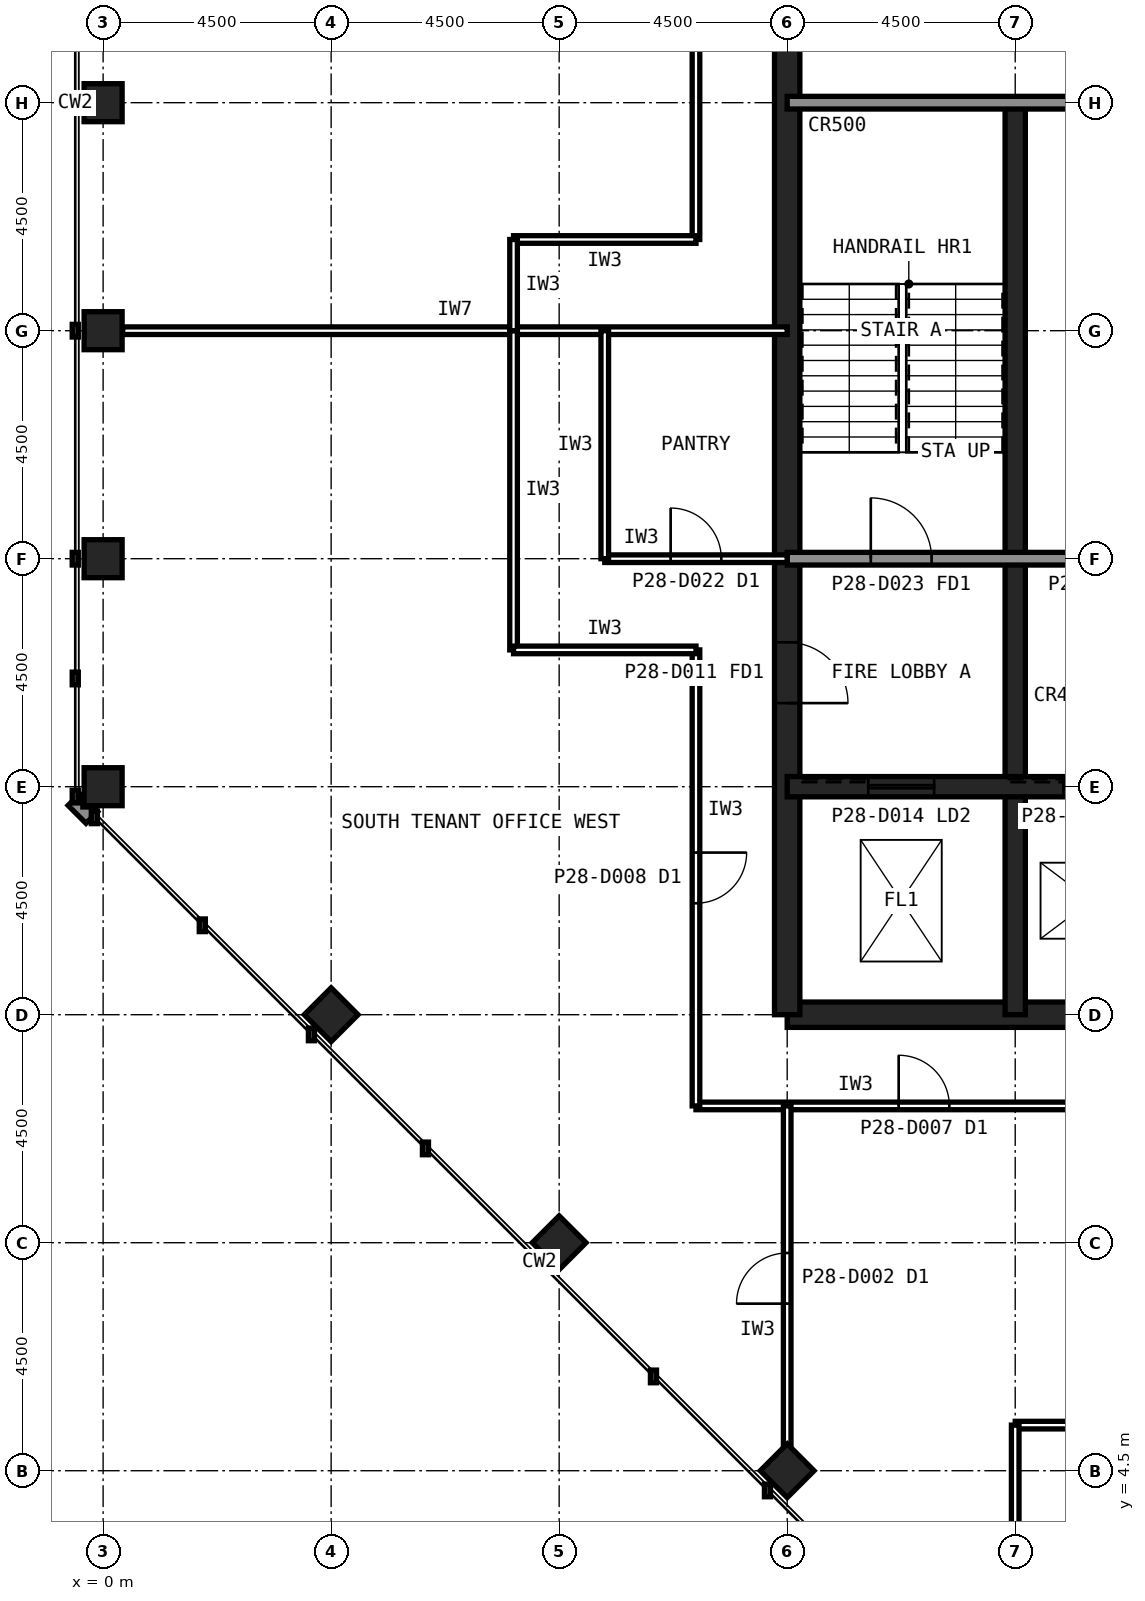
"""IFC4 building model, lengths in metres.
Left out: names, types, materials, properties, quantities, classifications, styles, units other than length and angle.
Written with IfcOpenShell. Run it as: python <this file> out.ifc"""

import sys

from ifc_helpers import new_model, si_unit, direction, frame, frame_2d, origin, origin_2d, place, context, subcontext, project, spatial, rectangle, hollow_rectangle, extrude, element, fill, save


model = new_model("IFC4")
c1 = context("Model", 3, precision=1e-05, world=origin(), true_north=direction((0.0, 1.0)))
c2 = subcontext(c1, "Body", "Model", "MODEL_VIEW")
j1 = project(units=[si_unit("LENGTHUNIT", "METRE"), si_unit("PLANEANGLEUNIT", "RADIAN")], contexts=[c1])
p1 = place(None, origin())
s1 = spatial("IfcSite", under=j1, at=p1, CompositionType="ELEMENT")
p2 = place(p1, origin())
s2 = spatial("IfcBuilding", under=s1, at=p2, CompositionType="ELEMENT")
p3 = place(p2, frame((0.0, 0.0, 119.6)))
s3 = spatial("IfcBuildingStorey", under=s2, at=p3, CompositionType="ELEMENT", Elevation=119.6)
for number, where, z_axis, x_axis in (
    (1, (0.0, 31.5, 0.0), (0.0, 0.0, 1.0), (1.0, 0.0, 0.0)),
    (2, (0.0, 27.0, 0.0), (0.0, 0.0, 1.0), (1.0, 0.0, 0.0)),
    (3, (0.0, 22.5, 0.0), (0.0, 0.0, 1.0), (1.0, 0.0, 0.0)),
    (4, (0.0, 18.0, 0.0), (0.0, 0.0, 1.0), (1.0, 0.0, 0.0)),
    (5, (13.5, 4.5, 0.0), (0.0, 0.0, 1.0), (0.707, 0.707, 0.0)),
    (6, (9.0, 9.0, 0.0), (0.0, 0.0, 1.0), (0.707, 0.707, 0.0)),
    (7, (4.5, 13.5, 0.0), (0.0, 0.0, 1.0), (0.707, 0.707, 0.0)),
):
    element("IfcColumn", number, at=place(p3, frame(where, z_axis=z_axis, x_axis=x_axis)), inside=s3, PredefinedType="COLUMN", context=c2, shape_type="SweptSolid", body=[
        extrude(hollow_rectangle(XDim=0.75, YDim=0.75, WallThickness=0.04, at=origin_2d()), origin(), (0.0, 0.0, 1.0), 4.0),
    ])
p4 = place(p3, frame((13.5, 13.5, 0.0), z_axis=(0.0, 0.0, 1.0), x_axis=(1.0, 0.0, 0.0)))
e8 = element("IfcWall", 8, at=p4, inside=s3, PredefinedType="SHEAR", context=c2, shape_type="SweptSolid", body=[
    extrude(rectangle(XDim=27.0, YDim=0.5, at=frame_2d((13.5, 0.0))), origin(), (0.0, 0.0, 1.0), 4.0),
])
p5 = place(p3, frame((13.5, 40.5, 0.0), z_axis=(0.0, 0.0, 1.0), x_axis=(0.0, -1.0, 0.0)))
e9 = element("IfcWall", 9, at=p5, inside=s3, PredefinedType="SHEAR", context=c2, shape_type="SweptSolid", body=[
    extrude(rectangle(XDim=27.0, YDim=0.5, at=frame_2d((13.5, 0.0))), origin(), (0.0, 0.0, 1.0), 4.0),
])
p6 = place(p5, frame((19.65, 0.0, 0.0)))
e10 = element("IfcOpeningElement", 10, at=p6, cuts=e9, PredefinedType="OPENING", context=c2, shape_type="SweptSolid", body=[
    extrude(rectangle(XDim=1.2, YDim=2.1, at=frame_2d((0.6, 1.05))), frame((0.0, 0.26, 0.0), z_axis=(0.0, -1.0, 0.0), x_axis=(1.0, 0.0, 0.0)), (0.0, 0.0, 1.0), 0.52),
])
p7 = place(p5, frame((5.85, 0.0, 0.0)))
e11 = element("IfcOpeningElement", 11, at=p7, cuts=e9, PredefinedType="OPENING", context=c2, shape_type="SweptSolid", body=[
    extrude(rectangle(XDim=1.8, YDim=2.1, at=frame_2d((0.9, 1.05))), frame((0.0, 0.26, 0.0), z_axis=(0.0, -1.0, 0.0), x_axis=(1.0, 0.0, 0.0)), (0.0, 0.0, 1.0), 0.52),
])
p8 = place(p3, frame((18.0, 13.5, 0.0), z_axis=(0.0, 0.0, 1.0), x_axis=(0.0, 1.0, 0.0)))
e12 = element("IfcWall", 12, at=p8, inside=s3, PredefinedType="SHEAR", context=c2, shape_type="SweptSolid", body=[
    extrude(rectangle(XDim=18.0, YDim=0.4, at=frame_2d((9.0, 0.0))), origin(), (0.0, 0.0, 1.0), 4.0),
])
p9 = place(p3, frame((13.5, 18.0, 0.0), z_axis=(0.0, 0.0, 1.0), x_axis=(1.0, 0.0, 0.0)))
e13 = element("IfcWall", 13, at=p9, inside=s3, PredefinedType="SHEAR", context=c2, shape_type="SweptSolid", body=[
    extrude(rectangle(XDim=27.0, YDim=0.4, at=frame_2d((13.5, 0.0))), origin(), (0.0, 0.0, 1.0), 4.0),
])
p10 = place(p9, frame((24.3, 0.0, 0.0)))
e14 = element("IfcOpeningElement", 14, at=p10, cuts=e13, PredefinedType="OPENING", context=c2, shape_type="SweptSolid", body=[
    extrude(rectangle(XDim=0.9, YDim=2.1, at=frame_2d((0.45, 1.05))), frame((0.0, 0.21, 0.0), z_axis=(0.0, -1.0, 0.0), x_axis=(1.0, 0.0, 0.0)), (0.0, 0.0, 1.0), 0.42),
])
p11 = place(p9, frame((5.45, 0.0, 0.0)))
e15 = element("IfcOpeningElement", 15, at=p11, cuts=e13, PredefinedType="OPENING", context=c2, shape_type="SweptSolid", body=[
    extrude(rectangle(XDim=1.1, YDim=2.1, at=frame_2d((0.55, 1.05))), frame((0.0, 0.21, 0.0), z_axis=(0.0, -1.0, 0.0), x_axis=(1.0, 0.0, 0.0)), (0.0, 0.0, 1.0), 0.42),
])
p12 = place(p9, frame((8.45, 0.0, 0.0)))
e16 = element("IfcOpeningElement", 16, at=p12, cuts=e13, PredefinedType="OPENING", context=c2, shape_type="SweptSolid", body=[
    extrude(rectangle(XDim=1.1, YDim=2.1, at=frame_2d((0.55, 1.05))), frame((0.0, 0.21, 0.0), z_axis=(0.0, -1.0, 0.0), x_axis=(1.0, 0.0, 0.0)), (0.0, 0.0, 1.0), 0.42),
])
p13 = place(p9, frame((11.45, 0.0, 0.0)))
e17 = element("IfcOpeningElement", 17, at=p13, cuts=e13, PredefinedType="OPENING", context=c2, shape_type="SweptSolid", body=[
    extrude(rectangle(XDim=1.1, YDim=2.1, at=frame_2d((0.55, 1.05))), frame((0.0, 0.21, 0.0), z_axis=(0.0, -1.0, 0.0), x_axis=(1.0, 0.0, 0.0)), (0.0, 0.0, 1.0), 0.42),
])
p14 = place(p9, frame((14.45, 0.0, 0.0)))
e18 = element("IfcOpeningElement", 18, at=p14, cuts=e13, PredefinedType="OPENING", context=c2, shape_type="SweptSolid", body=[
    extrude(rectangle(XDim=1.1, YDim=2.1, at=frame_2d((0.55, 1.05))), frame((0.0, 0.21, 0.0), z_axis=(0.0, -1.0, 0.0), x_axis=(1.0, 0.0, 0.0)), (0.0, 0.0, 1.0), 0.42),
])
p15 = place(p9, frame((17.45, 0.0, 0.0)))
e19 = element("IfcOpeningElement", 19, at=p15, cuts=e13, PredefinedType="OPENING", context=c2, shape_type="SweptSolid", body=[
    extrude(rectangle(XDim=1.1, YDim=2.1, at=frame_2d((0.55, 1.05))), frame((0.0, 0.21, 0.0), z_axis=(0.0, -1.0, 0.0), x_axis=(1.0, 0.0, 0.0)), (0.0, 0.0, 1.0), 0.42),
])
p16 = place(p9, frame((20.45, 0.0, 0.0)))
e20 = element("IfcOpeningElement", 20, at=p16, cuts=e13, PredefinedType="OPENING", context=c2, shape_type="SweptSolid", body=[
    extrude(rectangle(XDim=1.1, YDim=2.1, at=frame_2d((0.55, 1.05))), frame((0.0, 0.21, 0.0), z_axis=(0.0, -1.0, 0.0), x_axis=(1.0, 0.0, 0.0)), (0.0, 0.0, 1.0), 0.42),
])
p17 = place(p9, frame((1.6, 0.0, 0.0)))
e21 = element("IfcOpeningElement", 21, at=p17, cuts=e13, PredefinedType="OPENING", context=c2, shape_type="SweptSolid", body=[
    extrude(rectangle(XDim=1.3, YDim=2.2, at=frame_2d((0.65, 1.1))), frame((0.0, 0.21, 0.0), z_axis=(0.0, -1.0, 0.0), x_axis=(1.0, 0.0, 0.0)), (0.0, 0.0, 1.0), 0.42),
])
p18 = place(p3, frame((13.5, 22.5, 0.0), z_axis=(0.0, 0.0, 1.0), x_axis=(1.0, 0.0, 0.0)))
e22 = element("IfcWall", 22, at=p18, inside=s3, PredefinedType="SOLIDWALL", context=c2, shape_type="SweptSolid", body=[
    extrude(rectangle(XDim=27.0, YDim=0.25, at=frame_2d((13.5, 0.0))), origin(), (0.0, 0.0, 1.0), 3.84),
])
p19 = place(p18, frame((1.65, 0.0, 0.0)))
e23 = element("IfcOpeningElement", 23, at=p19, cuts=e22, PredefinedType="OPENING", context=c2, shape_type="SweptSolid", body=[
    extrude(rectangle(XDim=1.2, YDim=2.1, at=frame_2d((0.6, 1.05))), frame((0.0, 0.135, 0.0), z_axis=(0.0, -1.0, 0.0), x_axis=(1.0, 0.0, 0.0)), (0.0, 0.0, 1.0), 0.27),
])
p20 = place(p18, frame((6.025, 0.0, 0.0)))
e24 = element("IfcOpeningElement", 24, at=p20, cuts=e22, PredefinedType="OPENING", context=c2, shape_type="SweptSolid", body=[
    extrude(rectangle(XDim=1.0, YDim=2.1, at=frame_2d((0.5, 1.05))), frame((0.0, 0.135, 0.0), z_axis=(0.0, -1.0, 0.0), x_axis=(1.0, 0.0, 0.0)), (0.0, 0.0, 1.0), 0.27),
])
p21 = place(p18, frame((10.525, 0.0, 0.0)))
e25 = element("IfcOpeningElement", 25, at=p21, cuts=e22, PredefinedType="OPENING", context=c2, shape_type="SweptSolid", body=[
    extrude(rectangle(XDim=1.0, YDim=2.1, at=frame_2d((0.5, 1.05))), frame((0.0, 0.135, 0.0), z_axis=(0.0, -1.0, 0.0), x_axis=(1.0, 0.0, 0.0)), (0.0, 0.0, 1.0), 0.27),
])
p22 = place(p18, frame((19.75, 0.0, 0.0)))
e26 = element("IfcOpeningElement", 26, at=p22, cuts=e22, PredefinedType="OPENING", context=c2, shape_type="SweptSolid", body=[
    extrude(rectangle(XDim=1.0, YDim=2.1, at=frame_2d((0.5, 1.05))), frame((0.0, 0.135, 0.0), z_axis=(0.0, -1.0, 0.0), x_axis=(1.0, 0.0, 0.0)), (0.0, 0.0, 1.0), 0.27),
])
p23 = place(p18, frame((15.05, 0.0, 0.0)))
e27 = element("IfcOpeningElement", 27, at=p23, cuts=e22, PredefinedType="OPENING", context=c2, shape_type="SweptSolid", body=[
    extrude(rectangle(XDim=1.4, YDim=2.4, at=frame_2d((0.7, 1.2))), frame((0.0, 0.135, 0.0), z_axis=(0.0, -1.0, 0.0), x_axis=(1.0, 0.0, 0.0)), (0.0, 0.0, 1.0), 0.27),
])
p24 = place(p3, frame((13.5, 31.5, 0.0), z_axis=(0.0, 0.0, 1.0), x_axis=(1.0, 0.0, 0.0)))
e28 = element("IfcWall", 28, at=p24, inside=s3, PredefinedType="SOLIDWALL", context=c2, shape_type="SweptSolid", body=[
    extrude(rectangle(XDim=27.0, YDim=0.25, at=frame_2d((13.5, 0.0))), origin(), (0.0, 0.0, 1.0), 3.84),
])
p25 = place(p24, frame((24.15, 0.0, 0.0)))
e29 = element("IfcOpeningElement", 29, at=p25, cuts=e28, PredefinedType="OPENING", context=c2, shape_type="SweptSolid", body=[
    extrude(rectangle(XDim=1.2, YDim=2.1, at=frame_2d((0.6, 1.05))), frame((0.0, 0.135, 0.0), z_axis=(0.0, -1.0, 0.0), x_axis=(1.0, 0.0, 0.0)), (0.0, 0.0, 1.0), 0.27),
])
p26 = place(p24, frame((15.3, 0.0, 0.0)))
e30 = element("IfcOpeningElement", 30, at=p26, cuts=e28, PredefinedType="OPENING", context=c2, shape_type="SweptSolid", body=[
    extrude(rectangle(XDim=0.9, YDim=2.1, at=frame_2d((0.45, 1.05))), frame((0.0, 0.135, 0.0), z_axis=(0.0, -1.0, 0.0), x_axis=(1.0, 0.0, 0.0)), (0.0, 0.0, 1.0), 0.27),
])
p27 = place(p24, frame((19.8, 0.0, 0.0)))
e31 = element("IfcOpeningElement", 31, at=p27, cuts=e28, PredefinedType="OPENING", context=c2, shape_type="SweptSolid", body=[
    extrude(rectangle(XDim=0.9, YDim=2.1, at=frame_2d((0.45, 1.05))), frame((0.0, 0.135, 0.0), z_axis=(0.0, -1.0, 0.0), x_axis=(1.0, 0.0, 0.0)), (0.0, 0.0, 1.0), 0.27),
])
p28 = place(p3, frame((0.385, 27.0, 0.0), z_axis=(0.0, 0.0, 1.0), x_axis=(1.0, 0.0, 0.0)))
e32 = element("IfcWall", 32, at=p28, inside=s3, PredefinedType="PARTITIONING", context=c2, shape_type="SweptSolid", body=[
    extrude(rectangle(XDim=13.115, YDim=0.15, at=frame_2d((6.558, 0.0))), origin(), (0.0, 0.0, 1.0), 2.989),
])
p29 = place(p3, frame((11.7, 11.7, 0.0), z_axis=(0.0, 0.0, 1.0), x_axis=(1.0, 0.0, 0.0)))
e33 = element("IfcWall", 33, at=p29, inside=s3, PredefinedType="PARTITIONING", context=c2, shape_type="SweptSolid", body=[
    extrude(rectangle(XDim=9.0, YDim=0.15, at=frame_2d((4.5, 0.0))), origin(), (0.0, 0.0, 1.0), 3.84),
])
p30 = place(p29, frame((4.0, 0.0, 0.0)))
e34 = element("IfcOpeningElement", 34, at=p30, cuts=e33, PredefinedType="OPENING", context=c2, shape_type="SweptSolid", body=[
    extrude(rectangle(XDim=1.0, YDim=2.1, at=frame_2d((0.5, 1.05))), frame((0.0, 0.085, 0.0), z_axis=(0.0, -1.0, 0.0), x_axis=(1.0, 0.0, 0.0)), (0.0, 0.0, 1.0), 0.17),
])
p31 = place(p3, frame((11.7, 20.7, 0.0), z_axis=(0.0, 0.0, 1.0), x_axis=(0.0, -1.0, 0.0)))
e35 = element("IfcWall", 35, at=p31, inside=s3, PredefinedType="PARTITIONING", context=c2, shape_type="SweptSolid", body=[
    extrude(rectangle(XDim=9.0, YDim=0.15, at=frame_2d((4.5, 0.0))), origin(), (0.0, 0.0, 1.0), 3.84),
])
p32 = place(p31, frame((4.0, 0.0, 0.0)))
e36 = element("IfcOpeningElement", 36, at=p32, cuts=e35, PredefinedType="OPENING", context=c2, shape_type="SweptSolid", body=[
    extrude(rectangle(XDim=1.0, YDim=2.1, at=frame_2d((0.5, 1.05))), frame((0.0, 0.085, 0.0), z_axis=(0.0, -1.0, 0.0), x_axis=(1.0, 0.0, 0.0)), (0.0, 0.0, 1.0), 0.17),
])
p33 = place(p3, frame((8.1, 27.0, 0.0), z_axis=(0.0, 0.0, 1.0), x_axis=(0.0, -1.0, 0.0)))
e37 = element("IfcWall", 37, at=p33, inside=s3, PredefinedType="PARTITIONING", context=c2, shape_type="SweptSolid", body=[
    extrude(rectangle(XDim=6.3, YDim=0.15, at=frame_2d((3.15, 0.0))), origin(), (0.0, 0.0, 1.0), 3.84),
])
p34 = place(p3, frame((8.1, 20.7, 0.0), z_axis=(0.0, 0.0, 1.0), x_axis=(1.0, 0.0, 0.0)))
e38 = element("IfcWall", 38, at=p34, inside=s3, PredefinedType="PARTITIONING", context=c2, shape_type="SweptSolid", body=[
    extrude(rectangle(XDim=3.6, YDim=0.15, at=frame_2d((1.8, 0.0))), origin(), (0.0, 0.0, 1.0), 3.84),
])
p35 = place(p3, frame((11.7, 42.3, 0.0), z_axis=(0.0, 0.0, 1.0), x_axis=(0.0, -1.0, 0.0)))
e39 = element("IfcWall", 39, at=p35, inside=s3, PredefinedType="PARTITIONING", context=c2, shape_type="SweptSolid", body=[
    extrude(rectangle(XDim=13.5, YDim=0.15, at=frame_2d((6.75, 0.0))), origin(), (0.0, 0.0, 1.0), 3.84),
])
p36 = place(p35, frame((6.25, 0.0, 0.0)))
e40 = element("IfcOpeningElement", 40, at=p36, cuts=e39, PredefinedType="OPENING", context=c2, shape_type="SweptSolid", body=[
    extrude(rectangle(XDim=1.0, YDim=2.1, at=frame_2d((0.5, 1.05))), frame((0.0, 0.085, 0.0), z_axis=(0.0, -1.0, 0.0), x_axis=(1.0, 0.0, 0.0)), (0.0, 0.0, 1.0), 0.17),
])
p37 = place(p3, frame((11.7, 28.8, 0.0), z_axis=(0.0, 0.0, 1.0), x_axis=(-1.0, 0.0, 0.0)))
e41 = element("IfcWall", 41, at=p37, inside=s3, PredefinedType="PARTITIONING", context=c2, shape_type="SweptSolid", body=[
    extrude(rectangle(XDim=3.6, YDim=0.15, at=frame_2d((1.8, 0.0))), origin(), (0.0, 0.0, 1.0), 3.84),
])
p38 = place(p3, frame((8.1, 28.8, 0.0), z_axis=(0.0, 0.0, 1.0), x_axis=(0.0, -1.0, 0.0)))
e42 = element("IfcWall", 42, at=p38, inside=s3, PredefinedType="PARTITIONING", context=c2, shape_type="SweptSolid", body=[
    extrude(rectangle(XDim=1.8, YDim=0.15, at=frame_2d((0.9, 0.0))), origin(), (0.0, 0.0, 1.0), 3.84),
])
p39 = place(p3, frame((22.5, 5.4, 0.0), z_axis=(0.0, 0.0, 1.0), x_axis=(-1.0, 0.0, 0.0)))
e43 = element("IfcWall", 43, at=p39, inside=s3, PredefinedType="PARTITIONING", context=c2, shape_type="SweptSolid", body=[
    extrude(rectangle(XDim=4.5, YDim=0.15, at=frame_2d((2.25, 0.0))), origin(), (0.0, 0.0, 1.0), 3.84),
])
p40 = place(p39, frame((1.75, 0.0, 0.0)))
e44 = element("IfcOpeningElement", 44, at=p40, cuts=e43, PredefinedType="OPENING", context=c2, shape_type="SweptSolid", body=[
    extrude(rectangle(XDim=1.0, YDim=2.1, at=frame_2d((0.5, 1.05))), frame((0.0, 0.085, 0.0), z_axis=(0.0, -1.0, 0.0), x_axis=(1.0, 0.0, 0.0)), (0.0, 0.0, 1.0), 0.17),
])
p41 = place(p3, frame((18.0, 5.4, 0.0), z_axis=(0.0, 0.0, 1.0), x_axis=(0.0, -1.0, 0.0)))
e45 = element("IfcWall", 45, at=p41, inside=s3, PredefinedType="PARTITIONING", context=c2, shape_type="SweptSolid", body=[
    extrude(rectangle(XDim=5.015, YDim=0.15, at=frame_2d((2.507, 0.0))), origin(), (0.0, 0.0, 1.0), 2.989),
])
p42 = place(p3, frame((9.9, 22.5, 0.0), z_axis=(0.0, 0.0, 1.0), x_axis=(1.0, 0.0, 0.0)))
e46 = element("IfcWall", 46, at=p42, inside=s3, PredefinedType="PARTITIONING", context=c2, shape_type="SweptSolid", body=[
    extrude(rectangle(XDim=3.6, YDim=0.15, at=frame_2d((1.8, 0.0))), origin(), (0.0, 0.0, 1.0), 2.989),
])
p43 = place(p42, frame((1.3, 0.0, 0.0)))
e47 = element("IfcOpeningElement", 47, at=p43, cuts=e46, PredefinedType="OPENING", context=c2, shape_type="SweptSolid", body=[
    extrude(rectangle(XDim=1.0, YDim=2.1, at=frame_2d((0.5, 1.05))), frame((0.0, 0.085, 0.0), z_axis=(0.0, -1.0, 0.0), x_axis=(1.0, 0.0, 0.0)), (0.0, 0.0, 1.0), 0.17),
])
p44 = place(p3, frame((9.9, 27.0, 0.0), z_axis=(0.0, 0.0, 1.0), x_axis=(0.0, -1.0, 0.0)))
e48 = element("IfcWall", 48, at=p44, inside=s3, PredefinedType="PARTITIONING", context=c2, shape_type="SweptSolid", body=[
    extrude(rectangle(XDim=4.5, YDim=0.15, at=frame_2d((2.25, 0.0))), origin(), (0.0, 0.0, 1.0), 3.84),
])
p45 = place(p3, frame((13.5, 4.895, 0.0), z_axis=(0.0, 0.0, 1.0), x_axis=(0.0, 1.0, 0.0)))
e49 = element("IfcWall", 49, at=p45, inside=s3, PredefinedType="PARTITIONING", context=c2, shape_type="SweptSolid", body=[
    extrude(rectangle(XDim=6.805, YDim=0.15, at=frame_2d((3.402, 0.0))), origin(), (0.0, 0.0, 1.0), 2.989),
])
p46 = place(p45, frame((2.903, 0.0, 0.0)))
e50 = element("IfcOpeningElement", 50, at=p46, cuts=e49, PredefinedType="OPENING", context=c2, shape_type="SweptSolid", body=[
    extrude(rectangle(XDim=1.0, YDim=2.1, at=frame_2d((0.5, 1.05))), frame((0.0, 0.085, 0.0), z_axis=(0.0, -1.0, 0.0), x_axis=(1.0, 0.0, 0.0)), (0.0, 0.0, 1.0), 0.17),
])
p47 = place(p6, origin())
e51 = element("IfcDoor", 51, at=p47, inside=s3, OperationType="SINGLE_SWING_RIGHT", PredefinedType="DOOR", context=c2, shape_type="SweptSolid", body=[
    extrude(rectangle(XDim=1.2, YDim=2.1, at=frame_2d((0.6, 1.05))), frame((0.0, 0.025, 0.0), z_axis=(0.0, -1.0, 0.0), x_axis=(1.0, 0.0, 0.0)), (0.0, 0.0, 1.0), 0.05),
])
fill(e10, e51)
p48 = place(p19, origin())
e52 = element("IfcDoor", 52, at=p48, inside=s3, OperationType="SINGLE_SWING_LEFT", PredefinedType="DOOR", context=c2, shape_type="SweptSolid", body=[
    extrude(rectangle(XDim=1.2, YDim=2.1, at=frame_2d((0.6, 1.05))), frame((0.0, 0.025, 0.0), z_axis=(0.0, -1.0, 0.0), x_axis=(1.0, 0.0, 0.0)), (0.0, 0.0, 1.0), 0.05),
])
fill(e23, e52)
p49 = place(p11, origin())
e53 = element("IfcDoor", 53, at=p49, inside=s3, OperationType="SLIDING_TO_LEFT", PredefinedType="DOOR", context=c2, shape_type="SweptSolid", body=[
    extrude(rectangle(XDim=1.1, YDim=2.1, at=frame_2d((0.55, 1.05))), frame((0.0, 0.025, 0.0), z_axis=(0.0, -1.0, 0.0), x_axis=(1.0, 0.0, 0.0)), (0.0, 0.0, 1.0), 0.05),
])
fill(e15, e53)
p50 = place(p17, origin())
e54 = element("IfcDoor", 54, at=p50, inside=s3, OperationType="SLIDING_TO_LEFT", PredefinedType="DOOR", context=c2, shape_type="SweptSolid", body=[
    extrude(rectangle(XDim=1.3, YDim=2.2, at=frame_2d((0.65, 1.1))), frame((0.0, 0.025, 0.0), z_axis=(0.0, -1.0, 0.0), x_axis=(1.0, 0.0, 0.0)), (0.0, 0.0, 1.0), 0.05),
])
fill(e21, e54)
p51 = place(p30, origin())
e55 = element("IfcDoor", 55, at=p51, inside=s3, OperationType="SINGLE_SWING_LEFT", PredefinedType="DOOR", context=c2, shape_type="SweptSolid", body=[
    extrude(rectangle(XDim=1.0, YDim=2.1, at=frame_2d((0.5, 1.05))), frame((0.0, 0.025, 0.0), z_axis=(0.0, -1.0, 0.0), x_axis=(1.0, 0.0, 0.0)), (0.0, 0.0, 1.0), 0.05),
])
fill(e34, e55)
p52 = place(p32, origin())
e56 = element("IfcDoor", 56, at=p52, inside=s3, OperationType="SINGLE_SWING_LEFT", PredefinedType="DOOR", context=c2, shape_type="SweptSolid", body=[
    extrude(rectangle(XDim=1.0, YDim=2.1, at=frame_2d((0.5, 1.05))), frame((0.0, 0.025, 0.0), z_axis=(0.0, -1.0, 0.0), x_axis=(1.0, 0.0, 0.0)), (0.0, 0.0, 1.0), 0.05),
])
fill(e36, e56)
p53 = place(p43, origin())
e57 = element("IfcDoor", 57, at=p53, inside=s3, OperationType="SINGLE_SWING_LEFT", PredefinedType="DOOR", context=c2, shape_type="SweptSolid", body=[
    extrude(rectangle(XDim=1.0, YDim=2.1, at=frame_2d((0.5, 1.05))), frame((0.0, 0.025, 0.0), z_axis=(0.0, -1.0, 0.0), x_axis=(1.0, 0.0, 0.0)), (0.0, 0.0, 1.0), 0.05),
])
fill(e47, e57)
p54 = place(p46, origin())
e58 = element("IfcDoor", 58, at=p54, inside=s3, OperationType="SINGLE_SWING_LEFT", PredefinedType="DOOR", context=c2, shape_type="SweptSolid", body=[
    extrude(rectangle(XDim=1.0, YDim=2.1, at=frame_2d((0.5, 1.05))), frame((0.0, 0.025, 0.0), z_axis=(0.0, -1.0, 0.0), x_axis=(1.0, 0.0, 0.0)), (0.0, 0.0, 1.0), 0.05),
])
fill(e50, e58)
save(model, sys.argv[1])
